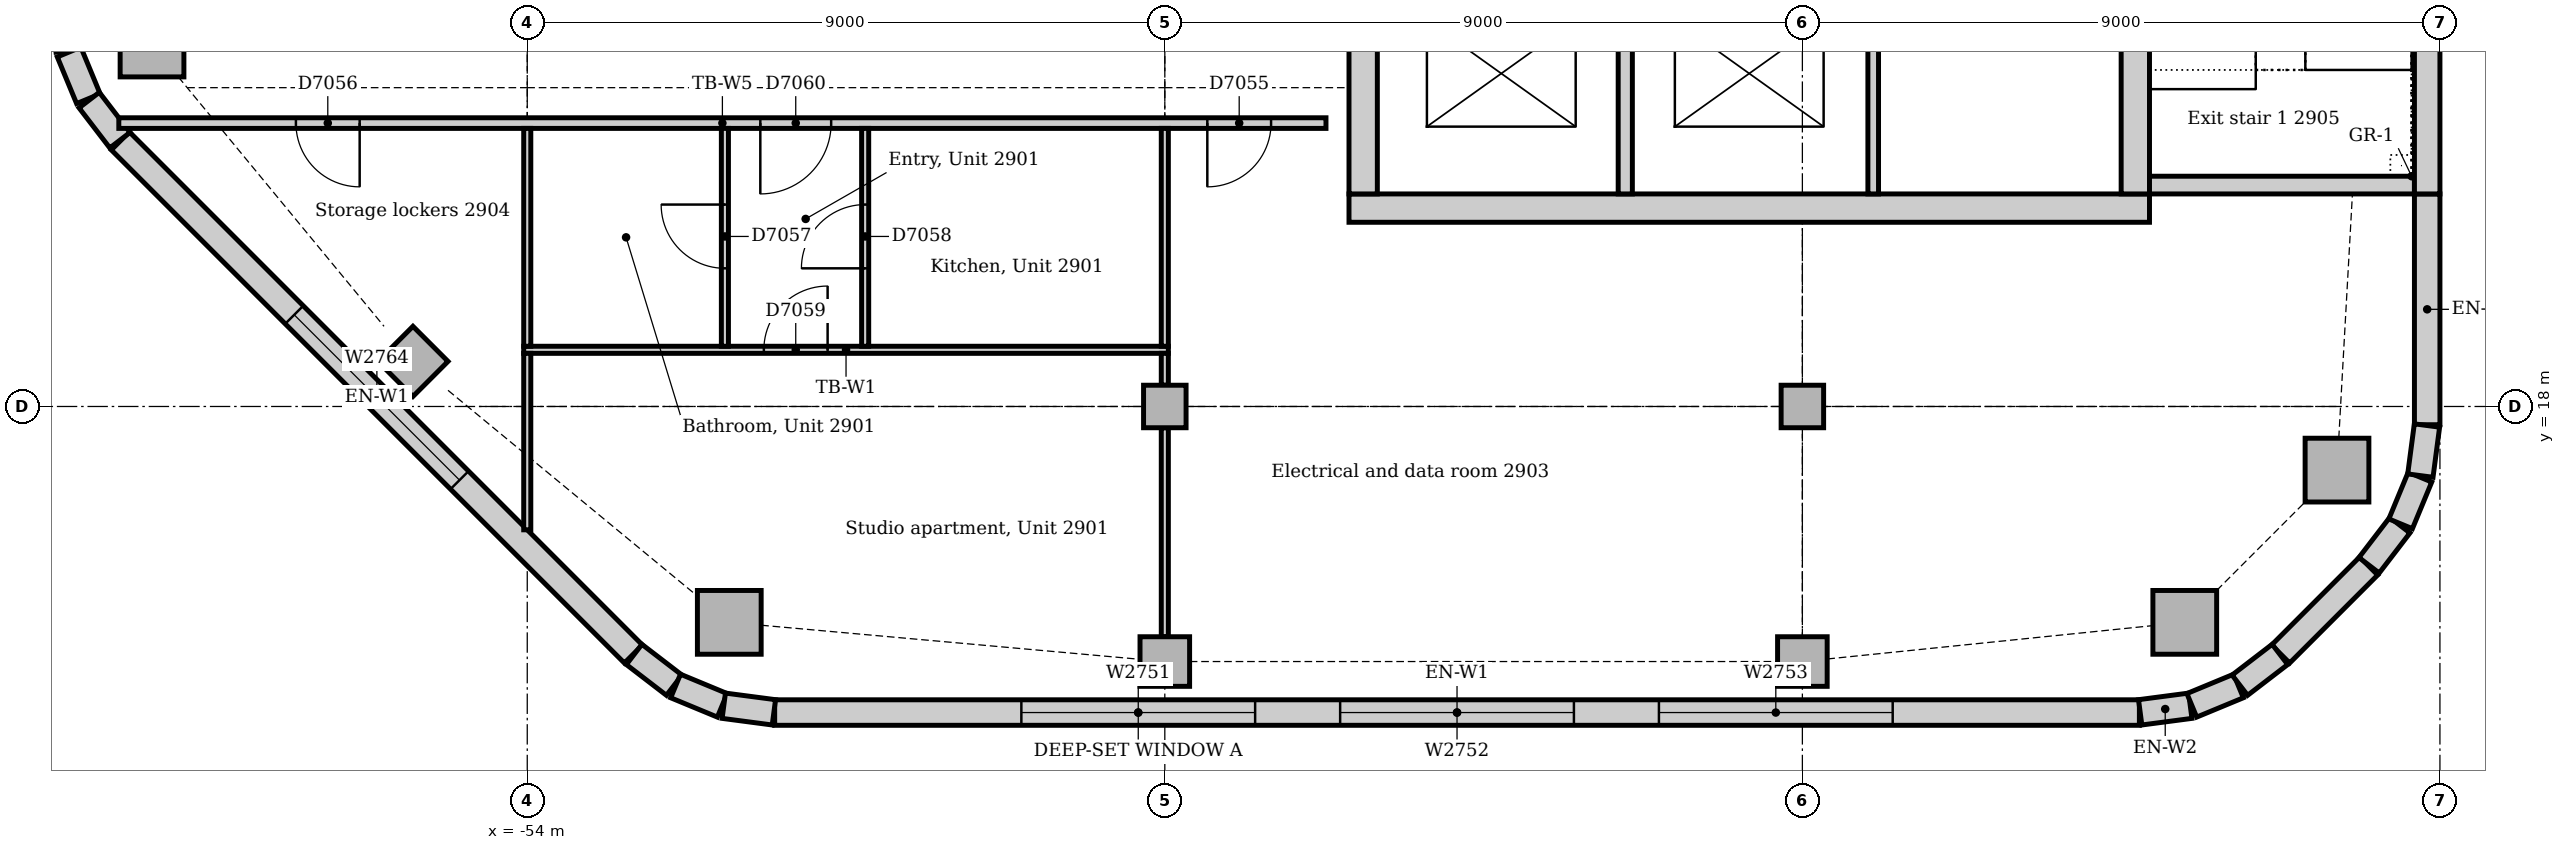
"""IFC4 building model, lengths in metres.
Left out: names, types, materials, properties, quantities, classifications, styles, units other than length and angle.
Written with IfcOpenShell. Run it as: python <this file> out.ifc"""

import sys

from ifc_helpers import new_model, si_unit, direction, frame, frame_2d, origin, origin_2d, place, context, subcontext, project, spatial, rectangle, extrude, element, fill, save


model = new_model("IFC4")
c1 = context("Model", 3, precision=1e-05, world=origin(), true_north=direction((0.0, 1.0)))
c2 = subcontext(c1, "Body", "Model", "MODEL_VIEW")
j1 = project(units=[si_unit("LENGTHUNIT", "METRE"), si_unit("PLANEANGLEUNIT", "RADIAN")], contexts=[c1])
p1 = place(None, origin())
s1 = spatial("IfcSite", under=j1, at=p1, CompositionType="ELEMENT")
p2 = place(p1, origin())
s2 = spatial("IfcBuilding", under=s1, at=p2, CompositionType="ELEMENT")
p3 = place(p2, frame((0.0, 0.0, 124.0)))
s3 = spatial("IfcBuildingStorey", under=s2, at=p3, CompositionType="ELEMENT", Elevation=124.0)
p4 = place(p3, frame((-42.4, 20.8, 0.0), z_axis=(0.0, 0.0, 1.0), x_axis=(1.0, 0.0, 0.0)))
e1 = element("IfcWall", 1, at=p4, inside=s3, PredefinedType="SOLIDWALL", context=c2, shape_type="SweptSolid", body=[
    extrude(rectangle(XDim=11.3, YDim=0.4, at=frame_2d((5.65, 0.0))), origin(), (0.0, 0.0, 1.0), 4.0),
])
p5 = place(p3, frame((-31.3, 21.0, 0.0), z_axis=(0.0, 0.0, 1.0), x_axis=(0.0, 1.0, 0.0)))
e2 = element("IfcWall", 2, at=p5, inside=s3, PredefinedType="SOLIDWALL", context=c2, shape_type="SweptSolid", body=[
    extrude(rectangle(XDim=9.5, YDim=0.4, at=frame_2d((4.75, 0.0))), origin(), (0.0, 0.0, 1.0), 4.0),
])
p6 = place(p5, frame((5.25, 0.0, 0.0)))
e3 = element("IfcOpeningElement", 3, at=p6, cuts=e2, PredefinedType="OPENING", context=c2, shape_type="SweptSolid", body=[
    extrude(rectangle(XDim=1.0, YDim=2.1, at=frame_2d((0.5, 1.05))), frame((0.0, 0.21, 0.0), z_axis=(0.0, -1.0, 0.0), x_axis=(1.0, 0.0, 0.0)), (0.0, 0.0, 1.0), 0.42),
])
p7 = place(p3, frame((-42.2, 30.5, 0.0), z_axis=(0.0, 0.0, 1.0), x_axis=(0.0, -1.0, 0.0)))
e4 = element("IfcWall", 4, at=p7, inside=s3, PredefinedType="SOLIDWALL", context=c2, shape_type="SweptSolid", body=[
    extrude(rectangle(XDim=9.5, YDim=0.4, at=frame_2d((4.75, 0.0))), origin(), (0.0, 0.0, 1.0), 4.0),
])
p8 = place(p7, frame((3.85, 0.0, 0.0)))
e5 = element("IfcOpeningElement", 5, at=p8, cuts=e4, PredefinedType="OPENING", context=c2, shape_type="SweptSolid", body=[
    extrude(rectangle(XDim=1.8, YDim=2.1, at=frame_2d((0.9, 1.05))), frame((0.0, 0.21, 0.0), z_axis=(0.0, -1.0, 0.0), x_axis=(1.0, 0.0, 0.0)), (0.0, 0.0, 1.0), 0.42),
])
p9 = place(p3, frame((-31.1, 21.125, 0.0), z_axis=(0.0, 0.0, 1.0), x_axis=(1.0, 0.0, 0.0)))
e6 = element("IfcWall", 6, at=p9, inside=s3, PredefinedType="SOLIDWALL", context=c2, shape_type="SweptSolid", body=[
    extrude(rectangle(XDim=3.74, YDim=0.25, at=frame_2d((1.87, 0.0))), origin(), (0.0, 0.0, 1.0), 4.0),
])
for number, where, z_axis, x_axis in (
    (7, (-51.148, 14.953, 0.0), (0.0, 0.0, 1.0), (1.0, 0.0, 0.0)),
    (8, (-30.602, 14.953, 0.0), (0.0, 0.0, 1.0), (1.0, 0.0, 0.0)),
    (9, (-28.453, 17.102, 0.0), (0.0, 0.0, 1.0), (1.0, 0.0, 0.0)),
    (10, (-59.297, 23.102, 0.0), (0.0, 0.0, 1.0), (1.0, 0.0, 0.0)),
):
    element("IfcColumn", number, at=place(p3, frame(where, z_axis=z_axis, x_axis=x_axis)), inside=s3, PredefinedType="COLUMN", context=c2, shape_type="SweptSolid", body=[
        extrude(rectangle(XDim=0.9, YDim=0.9, at=origin_2d()), origin(), (0.0, 0.0, 1.0), 3.85),
    ])
for number, where, z_axis, x_axis in (
    (11, (-45.0, 14.4, 0.0), (0.0, 0.0, 1.0), (1.0, 0.0, 0.0)),
    (12, (-36.0, 14.4, 0.0), (0.0, 0.0, 1.0), (1.0, 0.0, 0.0)),
    (13, (-55.614, 18.636, 0.0), (0.0, 0.0, 1.0), (0.707, 0.707, 0.0)),
):
    element("IfcColumn", number, at=place(p3, frame(where, z_axis=z_axis, x_axis=x_axis)), inside=s3, PredefinedType="COLUMN", context=c2, shape_type="SweptSolid", body=[
        extrude(rectangle(XDim=0.7, YDim=0.7, at=origin_2d()), origin(), (0.0, 0.0, 1.0), 3.85),
    ])
for number, where, z_axis, x_axis in (
    (14, (-45.0, 18.0, 0.0), (0.0, 0.0, 1.0), (1.0, 0.0, 0.0)),
    (15, (-36.0, 18.0, 0.0), (0.0, 0.0, 1.0), (1.0, 0.0, 0.0)),
):
    element("IfcColumn", number, at=place(p3, frame(where, z_axis=z_axis, x_axis=x_axis)), inside=s3, PredefinedType="COLUMN", context=c2, shape_type="SweptSolid", body=[
        extrude(rectangle(XDim=0.6, YDim=0.6, at=origin_2d()), origin(), (0.0, 0.0, 1.0), 3.85),
    ])
p10 = place(p3, frame((-50.507, 13.68, 0.0), z_axis=(0.0, 0.0, 1.0), x_axis=(1.0, 0.0, 0.0)))
e16 = element("IfcWall", 16, at=p10, inside=s3, PredefinedType="STANDARD", context=c2, shape_type="SweptSolid", body=[
    extrude(rectangle(XDim=19.265, YDim=0.36, at=frame_2d((9.632, 0.0))), origin(), (0.0, 0.0, 1.0), 3.85),
])
p11 = place(p10, frame((3.482, 0.0, 0.9)))
e17 = element("IfcOpeningElement", 17, at=p11, cuts=e16, PredefinedType="OPENING", context=c2, shape_type="SweptSolid", body=[
    extrude(rectangle(XDim=3.3, YDim=1.6, at=frame_2d((1.65, 0.8))), frame((0.0, 0.19, 0.0), z_axis=(0.0, -1.0, 0.0), x_axis=(1.0, 0.0, 0.0)), (0.0, 0.0, 1.0), 0.38),
])
p12 = place(p10, frame((7.982, 0.0, 0.9)))
e18 = element("IfcOpeningElement", 18, at=p12, cuts=e16, PredefinedType="OPENING", context=c2, shape_type="SweptSolid", body=[
    extrude(rectangle(XDim=3.3, YDim=1.6, at=frame_2d((1.65, 0.8))), frame((0.0, 0.19, 0.0), z_axis=(0.0, -1.0, 0.0), x_axis=(1.0, 0.0, 0.0)), (0.0, 0.0, 1.0), 0.38),
])
p13 = place(p10, frame((12.482, 0.0, 0.9)))
e19 = element("IfcOpeningElement", 19, at=p13, cuts=e16, PredefinedType="OPENING", context=c2, shape_type="SweptSolid", body=[
    extrude(rectangle(XDim=3.3, YDim=1.6, at=frame_2d((1.65, 0.8))), frame((0.0, 0.19, 0.0), z_axis=(0.0, -1.0, 0.0), x_axis=(1.0, 0.0, 0.0)), (0.0, 0.0, 1.0), 0.38),
])
p14 = place(p3, frame((-29.249, 14.506, 0.0), z_axis=(0.0, 0.0, 1.0), x_axis=(0.707106781187, 0.707106781187, 0.0)))
e20 = element("IfcWall", 20, at=p14, inside=s3, PredefinedType="STANDARD", context=c2, shape_type="SweptSolid", body=[
    extrude(rectangle(XDim=1.757, YDim=0.36, at=frame_2d((0.879, 0.0))), origin(), (0.0, 0.0, 1.0), 3.85),
])
p15 = place(p3, frame((-27.18, 17.743, 0.0), z_axis=(0.0, 0.0, 1.0), x_axis=(0.0, 1.0, 0.0)))
e21 = element("IfcWall", 21, at=p15, inside=s3, PredefinedType="STANDARD", context=c2, shape_type="SweptSolid", body=[
    extrude(rectangle(XDim=3.257, YDim=0.36, at=frame_2d((1.629, 0.0))), origin(), (0.0, 0.0, 1.0), 3.85),
])
p16 = place(p3, frame((-27.18, 21.0, 0.0), z_axis=(0.0, 0.0, 1.0), x_axis=(0.0, 1.0, 0.0)))
e22 = element("IfcWall", 22, at=p16, inside=s3, PredefinedType="STANDARD", context=c2, shape_type="SweptSolid", body=[
    extrude(rectangle(XDim=6.75, YDim=0.36, at=frame_2d((3.375, 0.0))), origin(), (0.0, 0.0, 1.0), 3.85),
])
p17 = place(p3, frame((-59.744, 21.749, 0.0), z_axis=(0.0, 0.0, 1.0), x_axis=(0.707106781187, -0.707106781187, 0.0)))
e23 = element("IfcWall", 23, at=p17, inside=s3, PredefinedType="STANDARD", context=c2, shape_type="SweptSolid", body=[
    extrude(rectangle(XDim=10.243, YDim=0.36, at=frame_2d((5.121, 0.0))), origin(), (0.0, 0.0, 1.0), 3.85),
])
p18 = place(p17, frame((3.471, 0.0, 0.9)))
e24 = element("IfcOpeningElement", 24, at=p18, cuts=e23, PredefinedType="OPENING", context=c2, shape_type="SweptSolid", body=[
    extrude(rectangle(XDim=3.3, YDim=1.6, at=frame_2d((1.65, 0.8))), frame((0.0, 0.19, 0.0), z_axis=(0.0, -1.0, 0.0), x_axis=(1.0, 0.0, 0.0)), (0.0, 0.0, 1.0), 0.38),
])
for number, where, z_axis, x_axis in (
    (25, (-31.231, 13.683, 0.0), (0.0, 0.0, 1.0), (0.991, 0.131, 0.0)),
    (26, (-30.503, 13.782, 0.0), (0.0, 0.0, 1.0), (0.924, 0.383, 0.0)),
):
    element("IfcWall", number, at=place(p3, frame(where, z_axis=z_axis, x_axis=x_axis)), inside=s3, PredefinedType="STANDARD", context=c2, shape_type="SweptSolid", body=[
        extrude(rectangle(XDim=0.713, YDim=0.36, at=frame_2d((0.356, 0.0))), origin(), (0.0, 0.0, 1.0), 3.85),
    ])
for number, where, z_axis, x_axis in (
    (27, (-29.825, 14.066, 0.0), (0.0, 0.0, 1.0), (0.793, 0.609, 0.0)),
    (28, (-28.0, 15.759, 0.0), (0.0, 0.0, 1.0), (0.609, 0.793, 0.0)),
):
    element("IfcWall", number, at=place(p3, frame(where, z_axis=z_axis, x_axis=x_axis)), inside=s3, PredefinedType="STANDARD", context=c2, shape_type="SweptSolid", body=[
        extrude(rectangle(XDim=0.713, YDim=0.36, at=frame_2d((0.357, 0.0))), origin(), (0.0, 0.0, 1.0), 3.85),
    ])
for number, where, z_axis, x_axis in (
    (29, (-27.555, 16.344, 0.0), (0.0, 0.0, 1.0), (0.383, 0.924, 0.0)),
    (30, (-27.276, 17.024, 0.0), (0.0, 0.0, 1.0), (0.131, 0.991, 0.0)),
    (31, (-60.468, 23.003, 0.0), (0.0, 0.0, 1.0), (0.383, -0.924, 0.0)),
):
    element("IfcWall", number, at=place(p3, frame(where, z_axis=z_axis, x_axis=x_axis)), inside=s3, PredefinedType="STANDARD", context=c2, shape_type="SweptSolid", body=[
        extrude(rectangle(XDim=0.713, YDim=0.36, at=frame_2d((0.356, 0.0))), origin(), (0.0, 0.0, 1.0), 3.85),
    ])
for number, where, z_axis, x_axis in (
    (32, (-60.184, 22.325, 0.0), (0.0, 0.0, 1.0), (0.609, -0.793, 0.0)),
    (33, (-52.491, 14.5, 0.0), (0.0, 0.0, 1.0), (0.793, -0.609, 0.0)),
):
    element("IfcWall", number, at=place(p3, frame(where, z_axis=z_axis, x_axis=x_axis)), inside=s3, PredefinedType="STANDARD", context=c2, shape_type="SweptSolid", body=[
        extrude(rectangle(XDim=0.713, YDim=0.36, at=frame_2d((0.357, 0.0))), origin(), (0.0, 0.0, 1.0), 3.85),
    ])
for number, where, z_axis, x_axis in (
    (34, (-51.906, 14.055, 0.0), (0.0, 0.0, 1.0), (0.924, -0.383, 0.0)),
    (35, (-51.226, 13.776, 0.0), (0.0, 0.0, 1.0), (0.991, -0.131, 0.0)),
):
    element("IfcWall", number, at=place(p3, frame(where, z_axis=z_axis, x_axis=x_axis)), inside=s3, PredefinedType="STANDARD", context=c2, shape_type="SweptSolid", body=[
        extrude(rectangle(XDim=0.713, YDim=0.36, at=frame_2d((0.356, 0.0))), origin(), (0.0, 0.0, 1.0), 3.85),
    ])
p19 = place(p3, frame((-38.5, 21.0, 0.0), z_axis=(0.0, 0.0, 1.0), x_axis=(0.0, 1.0, 0.0)))
e36 = element("IfcWall", 36, at=p19, inside=s3, PredefinedType="SOLIDWALL", context=c2, shape_type="SweptSolid", body=[
    extrude(rectangle(XDim=3.1, YDim=0.2, at=frame_2d((1.55, 0.0))), origin(), (0.0, 0.0, 1.0), 4.0),
])
p20 = place(p3, frame((-35.0, 21.0, 0.0), z_axis=(0.0, 0.0, 1.0), x_axis=(0.0, 1.0, 0.0)))
e37 = element("IfcWall", 37, at=p20, inside=s3, PredefinedType="SOLIDWALL", context=c2, shape_type="SweptSolid", body=[
    extrude(rectangle(XDim=2.9, YDim=0.15, at=frame_2d((1.45, 0.0))), origin(), (0.0, 0.0, 1.0), 4.0),
])
p21 = place(p3, frame((-59.766, 22.0, 0.0), z_axis=(0.0, 0.0, 1.0), x_axis=(1.0, 0.0, 0.0)))
e38 = element("IfcWall", 38, at=p21, inside=s3, PredefinedType="PARTITIONING", context=c2, shape_type="SweptSolid", body=[
    extrude(rectangle(XDim=17.041, YDim=0.15, at=frame_2d((8.52, 0.0))), origin(), (0.0, 0.0, 1.0), 3.85),
])
p22 = place(p21, frame((15.366, 0.0, 0.0)))
e39 = element("IfcOpeningElement", 39, at=p22, cuts=e38, PredefinedType="OPENING", context=c2, shape_type="SweptSolid", body=[
    extrude(rectangle(XDim=0.9, YDim=2.1, at=frame_2d((0.45, 1.05))), frame((0.0, 0.085, 0.0), z_axis=(0.0, -1.0, 0.0), x_axis=(1.0, 0.0, 0.0)), (0.0, 0.0, 1.0), 0.17),
])
p23 = place(p21, frame((2.5, 0.0, 0.0)))
e40 = element("IfcOpeningElement", 40, at=p23, cuts=e38, PredefinedType="OPENING", context=c2, shape_type="SweptSolid", body=[
    extrude(rectangle(XDim=0.9, YDim=2.1, at=frame_2d((0.45, 1.05))), frame((0.0, 0.085, 0.0), z_axis=(0.0, -1.0, 0.0), x_axis=(1.0, 0.0, 0.0)), (0.0, 0.0, 1.0), 0.17),
])
p24 = place(p21, frame((9.056, 0.0, 0.0)))
e41 = element("IfcOpeningElement", 41, at=p24, cuts=e38, PredefinedType="OPENING", context=c2, shape_type="SweptSolid", body=[
    extrude(rectangle(XDim=1.0, YDim=2.1, at=frame_2d((0.5, 1.05))), frame((0.0, 0.085, 0.0), z_axis=(0.0, -1.0, 0.0), x_axis=(1.0, 0.0, 0.0)), (0.0, 0.0, 1.0), 0.17),
])
p25 = place(p3, frame((-54.05, 18.8, 0.0), z_axis=(0.0, 0.0, 1.0), x_axis=(1.0, 0.0, 0.0)))
e42 = element("IfcWall", 42, at=p25, inside=s3, PredefinedType="PARTITIONING", context=c2, shape_type="SweptSolid", body=[
    extrude(rectangle(XDim=9.1, YDim=0.1, at=frame_2d((4.55, 0.0))), origin(), (0.0, 0.0, 1.0), 3.85),
])
p26 = place(p25, frame((3.39, 0.0, 0.0)))
e43 = element("IfcOpeningElement", 43, at=p26, cuts=e42, PredefinedType="OPENING", context=c2, shape_type="SweptSolid", body=[
    extrude(rectangle(XDim=0.9, YDim=2.1, at=frame_2d((0.45, 1.05))), frame((0.0, 0.06, 0.0), z_axis=(0.0, -1.0, 0.0), x_axis=(1.0, 0.0, 0.0)), (0.0, 0.0, 1.0), 0.12),
])
p27 = place(p3, frame((-45.0, 18.85, 0.0), z_axis=(0.0, 0.0, 1.0), x_axis=(0.0, 1.0, 0.0)))
e44 = element("IfcWall", 44, at=p27, inside=s3, PredefinedType="PARTITIONING", context=c2, shape_type="SweptSolid", body=[
    extrude(rectangle(XDim=3.075, YDim=0.1, at=frame_2d((1.538, 0.0))), origin(), (0.0, 0.0, 1.0), 3.362),
])
p28 = place(p3, frame((-45.0, 18.3, 0.0), z_axis=(0.0, 0.0, 1.0), x_axis=(0.0, 1.0, 0.0)))
e45 = element("IfcWall", 45, at=p28, inside=s3, PredefinedType="PARTITIONING", context=c2, shape_type="SweptSolid", body=[
    extrude(rectangle(XDim=0.45, YDim=0.1, at=frame_2d((0.225, 0.0))), origin(), (0.0, 0.0, 1.0), 3.85),
])
p29 = place(p3, frame((-45.0, 14.75, 0.0), z_axis=(0.0, 0.0, 1.0), x_axis=(0.0, 1.0, 0.0)))
e46 = element("IfcWall", 46, at=p29, inside=s3, PredefinedType="PARTITIONING", context=c2, shape_type="SweptSolid", body=[
    extrude(rectangle(XDim=2.95, YDim=0.1, at=frame_2d((1.475, 0.0))), origin(), (0.0, 0.0, 1.0), 3.652),
])
p30 = place(p3, frame((-54.0, 18.85, 0.0), z_axis=(0.0, 0.0, 1.0), x_axis=(0.0, 1.0, 0.0)))
e47 = element("IfcWall", 47, at=p30, inside=s3, PredefinedType="PARTITIONING", context=c2, shape_type="SweptSolid", body=[
    extrude(rectangle(XDim=3.075, YDim=0.1, at=frame_2d((1.538, 0.0))), origin(), (0.0, 0.0, 1.0), 3.362),
])
p31 = place(p3, frame((-54.0, 16.259, 0.0), z_axis=(0.0, 0.0, 1.0), x_axis=(0.0, 1.0, 0.0)))
e48 = element("IfcWall", 48, at=p31, inside=s3, PredefinedType="PARTITIONING", context=c2, shape_type="SweptSolid", body=[
    extrude(rectangle(XDim=2.491, YDim=0.1, at=frame_2d((1.245, 0.0))), origin(), (0.0, 0.0, 1.0), 3.362),
])
p32 = place(p3, frame((-51.21, 18.85, 0.0), z_axis=(0.0, 0.0, 1.0), x_axis=(0.0, 1.0, 0.0)))
e49 = element("IfcWall", 49, at=p32, inside=s3, PredefinedType="PARTITIONING", context=c2, shape_type="SweptSolid", body=[
    extrude(rectangle(XDim=3.075, YDim=0.1, at=frame_2d((1.538, 0.0))), origin(), (0.0, 0.0, 1.0), 3.85),
])
p33 = place(p32, frame((1.1, 0.0, 0.0)))
e50 = element("IfcOpeningElement", 50, at=p33, cuts=e49, PredefinedType="OPENING", context=c2, shape_type="SweptSolid", body=[
    extrude(rectangle(XDim=0.9, YDim=2.1, at=frame_2d((0.45, 1.05))), frame((0.0, 0.06, 0.0), z_axis=(0.0, -1.0, 0.0), x_axis=(1.0, 0.0, 0.0)), (0.0, 0.0, 1.0), 0.12),
])
p34 = place(p3, frame((-49.23, 18.85, 0.0), z_axis=(0.0, 0.0, 1.0), x_axis=(0.0, 1.0, 0.0)))
e51 = element("IfcWall", 51, at=p34, inside=s3, PredefinedType="PARTITIONING", context=c2, shape_type="SweptSolid", body=[
    extrude(rectangle(XDim=3.075, YDim=0.1, at=frame_2d((1.538, 0.0))), origin(), (0.0, 0.0, 1.0), 3.85),
])
p35 = place(p34, frame((1.1, 0.0, 0.0)))
e52 = element("IfcOpeningElement", 52, at=p35, cuts=e51, PredefinedType="OPENING", context=c2, shape_type="SweptSolid", body=[
    extrude(rectangle(XDim=0.9, YDim=2.1, at=frame_2d((0.45, 1.05))), frame((0.0, 0.06, 0.0), z_axis=(0.0, -1.0, 0.0), x_axis=(1.0, 0.0, 0.0)), (0.0, 0.0, 1.0), 0.12),
])
p36 = place(p11, origin())
e53 = element("IfcWindow", 53, at=p36, inside=s3, PartitioningType="SINGLE_PANEL", PredefinedType="WINDOW", context=c2, shape_type="SweptSolid", body=[
    extrude(rectangle(XDim=3.3, YDim=1.6, at=frame_2d((1.65, 0.8))), frame((0.0, 0.13, 0.0), z_axis=(0.0, -1.0, 0.0), x_axis=(1.0, 0.0, 0.0)), (0.0, 0.0, 1.0), 0.06),
])
fill(e17, e53)
p37 = place(p12, origin())
e54 = element("IfcWindow", 54, at=p37, inside=s3, PartitioningType="SINGLE_PANEL", PredefinedType="WINDOW", context=c2, shape_type="SweptSolid", body=[
    extrude(rectangle(XDim=3.3, YDim=1.6, at=frame_2d((1.65, 0.8))), frame((0.0, 0.13, 0.0), z_axis=(0.0, -1.0, 0.0), x_axis=(1.0, 0.0, 0.0)), (0.0, 0.0, 1.0), 0.06),
])
fill(e18, e54)
p38 = place(p13, origin())
e55 = element("IfcWindow", 55, at=p38, inside=s3, PartitioningType="SINGLE_PANEL", PredefinedType="WINDOW", context=c2, shape_type="SweptSolid", body=[
    extrude(rectangle(XDim=3.3, YDim=1.6, at=frame_2d((1.65, 0.8))), frame((0.0, 0.13, 0.0), z_axis=(0.0, -1.0, 0.0), x_axis=(1.0, 0.0, 0.0)), (0.0, 0.0, 1.0), 0.06),
])
fill(e19, e55)
p39 = place(p18, origin())
e56 = element("IfcWindow", 56, at=p39, inside=s3, PartitioningType="SINGLE_PANEL", PredefinedType="WINDOW", context=c2, shape_type="SweptSolid", body=[
    extrude(rectangle(XDim=3.3, YDim=1.6, at=frame_2d((1.65, 0.8))), frame((0.0, 0.13, 0.0), z_axis=(0.0, -1.0, 0.0), x_axis=(1.0, 0.0, 0.0)), (0.0, 0.0, 1.0), 0.06),
])
fill(e24, e56)
p40 = place(p22, frame((0.9, 0.0, 0.0), z_axis=(0.0, 0.0, 1.0), x_axis=(-1.0, 0.0, 0.0)))
e57 = element("IfcDoor", 57, at=p40, inside=s3, OperationType="SINGLE_SWING_RIGHT", PredefinedType="DOOR", context=c2, shape_type="SweptSolid", body=[
    extrude(rectangle(XDim=0.9, YDim=2.1, at=frame_2d((0.45, 1.05))), frame((0.0, 0.025, 0.0), z_axis=(0.0, -1.0, 0.0), x_axis=(1.0, 0.0, 0.0)), (0.0, 0.0, 1.0), 0.05),
])
fill(e39, e57)
p41 = place(p23, frame((0.9, 0.0, 0.0), z_axis=(0.0, 0.0, 1.0), x_axis=(-1.0, 0.0, 0.0)))
e58 = element("IfcDoor", 58, at=p41, inside=s3, OperationType="SINGLE_SWING_LEFT", PredefinedType="DOOR", context=c2, shape_type="SweptSolid", body=[
    extrude(rectangle(XDim=0.9, YDim=2.1, at=frame_2d((0.45, 1.05))), frame((0.0, 0.025, 0.0), z_axis=(0.0, -1.0, 0.0), x_axis=(1.0, 0.0, 0.0)), (0.0, 0.0, 1.0), 0.05),
])
fill(e40, e58)
p42 = place(p33, origin())
e59 = element("IfcDoor", 59, at=p42, inside=s3, OperationType="SINGLE_SWING_RIGHT", PredefinedType="DOOR", context=c2, shape_type="SweptSolid", body=[
    extrude(rectangle(XDim=0.9, YDim=2.1, at=frame_2d((0.45, 1.05))), frame((0.0, 0.025, 0.0), z_axis=(0.0, -1.0, 0.0), x_axis=(1.0, 0.0, 0.0)), (0.0, 0.0, 1.0), 0.05),
])
fill(e50, e59)
p43 = place(p35, origin())
e60 = element("IfcDoor", 60, at=p43, inside=s3, OperationType="SINGLE_SWING_LEFT", PredefinedType="DOOR", context=c2, shape_type="SweptSolid", body=[
    extrude(rectangle(XDim=0.9, YDim=2.1, at=frame_2d((0.45, 1.05))), frame((0.0, 0.025, 0.0), z_axis=(0.0, -1.0, 0.0), x_axis=(1.0, 0.0, 0.0)), (0.0, 0.0, 1.0), 0.05),
])
fill(e52, e60)
p44 = place(p26, origin())
e61 = element("IfcDoor", 61, at=p44, inside=s3, OperationType="SINGLE_SWING_RIGHT", PredefinedType="DOOR", context=c2, shape_type="SweptSolid", body=[
    extrude(rectangle(XDim=0.9, YDim=2.1, at=frame_2d((0.45, 1.05))), frame((0.0, 0.025, 0.0), z_axis=(0.0, -1.0, 0.0), x_axis=(1.0, 0.0, 0.0)), (0.0, 0.0, 1.0), 0.05),
])
fill(e43, e61)
p45 = place(p24, frame((1.0, 0.0, 0.0), z_axis=(0.0, 0.0, 1.0), x_axis=(-1.0, 0.0, 0.0)))
e62 = element("IfcDoor", 62, at=p45, inside=s3, OperationType="SINGLE_SWING_RIGHT", PredefinedType="DOOR", context=c2, shape_type="SweptSolid", body=[
    extrude(rectangle(XDim=1.0, YDim=2.1, at=frame_2d((0.5, 1.05))), frame((0.0, 0.025, 0.0), z_axis=(0.0, -1.0, 0.0), x_axis=(1.0, 0.0, 0.0)), (0.0, 0.0, 1.0), 0.05),
])
fill(e41, e62)
save(model, sys.argv[1])
